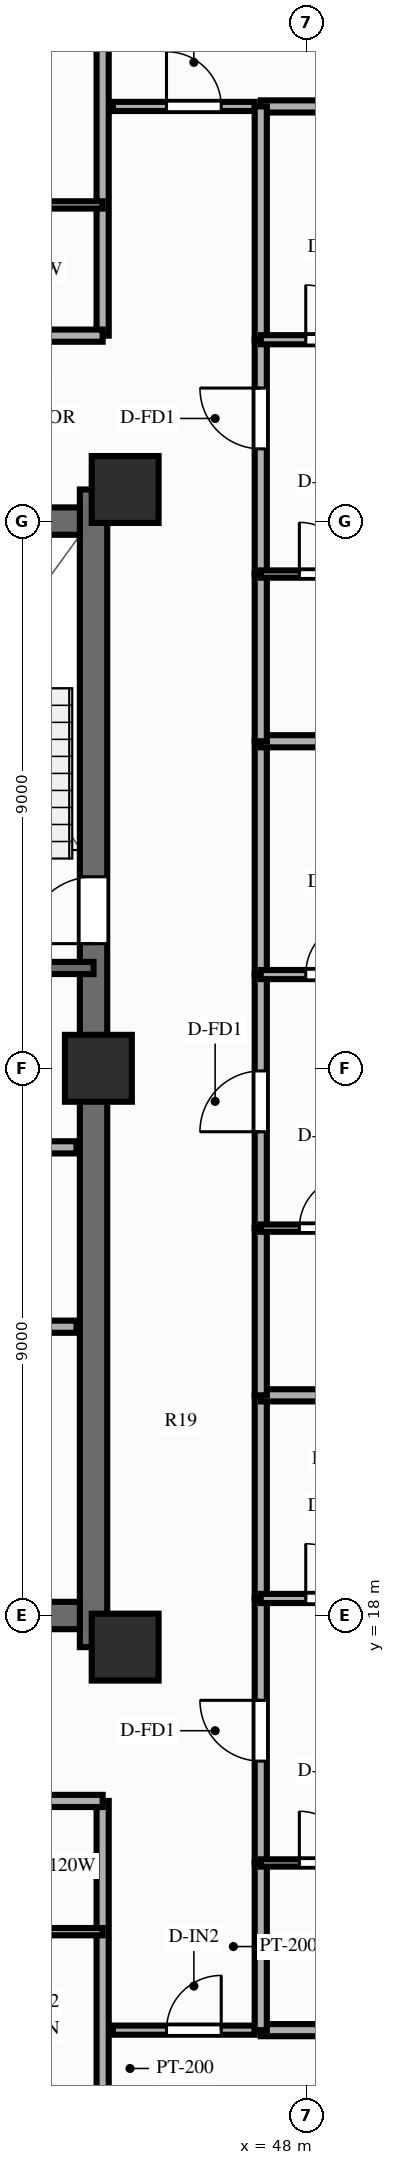
"""IFC4 building model, lengths in metres.
Left out: names, types, materials, properties, quantities, classifications, styles, units other than length and angle.
Written with IfcOpenShell. Run it as: python <this file> out.ifc"""

import sys

from ifc_helpers import new_model, si_unit, direction, frame, frame_2d, origin, origin_2d, place, context, subcontext, project, spatial, rectangle, extrude, source, transform, mapped, element, fill, save


model = new_model("IFC4")
c1 = context("Model", 3, precision=1e-05, world=origin(), true_north=direction((0.0, 1.0)))
c2 = subcontext(c1, "Body", "Model", "MODEL_VIEW")
j1 = project(units=[si_unit("LENGTHUNIT", "METRE"), si_unit("PLANEANGLEUNIT", "RADIAN")], contexts=[c1])
p1 = place(None, origin())
s1 = spatial("IfcSite", under=j1, at=p1, CompositionType="ELEMENT")
p2 = place(p1, origin())
s2 = spatial("IfcBuilding", under=s1, at=p2, CompositionType="ELEMENT")
p3 = place(p2, frame((0.0, 0.0, 172.9)))
s3 = spatial("IfcBuildingStorey", under=s2, at=p3, CompositionType="ELEMENT", Elevation=172.9)
p4 = place(p3, frame((44.5, 17.48, 0.0), z_axis=(0.0, 0.0, 1.0), x_axis=(0.0, 1.0, 0.0)))
e1 = element("IfcWall", 1, at=p4, inside=s3, PredefinedType="SHEAR", context=c2, shape_type="SweptSolid", body=[
    extrude(rectangle(XDim=19.04, YDim=0.45, at=frame_2d((9.52, 0.0))), origin(), (0.0, 0.0, 1.0), 3.9),
])
p5 = place(p4, frame((12.67, 0.0, 0.0), z_axis=(0.0, 0.0, 1.0), x_axis=(-1.0, 0.0, 0.0)))
e2 = element("IfcOpeningElement", 2, at=p5, cuts=e1, PredefinedType="OPENING", context=c2, shape_type="SweptSolid", body=[
    extrude(rectangle(XDim=1.1, YDim=2.15, at=frame_2d((0.55, 1.075))), frame((0.0, 0.237, 0.0), z_axis=(0.0, -1.0, 0.0), x_axis=(1.0, 0.0, 0.0)), (0.0, 0.0, 1.0), 0.474),
])
p6 = place(p3, frame((31.725, 18.0, 0.0), z_axis=(0.0, 0.0, 1.0), x_axis=(1.0, 0.0, 0.0)))
e3 = element("IfcWall", 3, at=p6, inside=s3, PredefinedType="SHEAR", context=c2, shape_type="SweptSolid", body=[
    extrude(rectangle(XDim=12.55, YDim=0.45, at=frame_2d((6.275, 0.0))), origin(), (0.0, 0.0, 1.0), 3.9),
])
p7 = place(p3, frame((31.725, 36.0, 0.0), z_axis=(0.0, 0.0, 1.0), x_axis=(1.0, 0.0, 0.0)))
e4 = element("IfcWall", 4, at=p7, inside=s3, PredefinedType="SHEAR", context=c2, shape_type="SweptSolid", body=[
    extrude(rectangle(XDim=12.55, YDim=0.45, at=frame_2d((6.275, 0.0))), origin(), (0.0, 0.0, 1.0), 3.9),
])
p8 = place(p7, frame((5.225, 0.0, 0.0), z_axis=(0.0, 0.0, 1.0), x_axis=(-1.0, 0.0, 0.0)))
e5 = element("IfcOpeningElement", 5, at=p8, cuts=e4, PredefinedType="OPENING", context=c2, shape_type="SweptSolid", body=[
    extrude(rectangle(XDim=1.4, YDim=2.15, at=frame_2d((0.7, 1.075))), frame((0.0, 0.237, 0.0), z_axis=(0.0, -1.0, 0.0), x_axis=(1.0, 0.0, 0.0)), (0.0, 0.0, 1.0), 0.474),
])
m1 = source(origin(), c2, "Body", "SweptSolid", [
    extrude(rectangle(XDim=1.1, YDim=1.1, at=origin_2d()), origin(), (0.0, 0.0, 1.0), 3.9),
])
for number, where, z_axis, x_axis in (
    (6, (45.02, 17.48, 0.0), (0.0, 0.0, 1.0), (1.0, 0.0, 0.0)),
    (7, (45.02, 36.52, 0.0), (0.0, 0.0, 1.0), (1.0, 0.0, 0.0)),
    (8, (44.58, 27.0, 0.0), (0.0, 0.0, 1.0), (1.0, 0.0, 0.0)),
):
    element("IfcColumn", number, at=place(p3, frame(where, z_axis=z_axis, x_axis=x_axis)), inside=s3, PredefinedType="COLUMN", context=c2, shape_type="MappedRepresentation", body=[
        mapped(m1, transform((0.0, 0.0, 0.0), scale=1.0)),
    ])
p9 = place(p3, frame((41.55, 22.75, 0.0), z_axis=(0.0, 0.0, 1.0), x_axis=(1.0, 0.0, 0.0)))
e9 = element("IfcWall", 9, at=p9, inside=s3, PredefinedType="PARTITIONING", context=c2, shape_type="SweptSolid", body=[
    extrude(rectangle(XDim=2.67, YDim=0.2, at=frame_2d((1.335, 0.0))), origin(), (0.0, 0.0, 1.0), 3.69),
])
p10 = place(p3, frame((41.55, 25.7, 0.0), z_axis=(0.0, 0.0, 1.0), x_axis=(1.0, 0.0, 0.0)))
e10 = element("IfcWall", 10, at=p10, inside=s3, PredefinedType="PARTITIONING", context=c2, shape_type="SweptSolid", body=[
    extrude(rectangle(XDim=2.67, YDim=0.2, at=frame_2d((1.335, 0.0))), origin(), (0.0, 0.0, 1.0), 3.04),
])
p11 = place(p3, frame((40.57, 28.65, 0.0), z_axis=(0.0, 0.0, 1.0), x_axis=(1.0, 0.0, 0.0)))
e11 = element("IfcWall", 11, at=p11, inside=s3, PredefinedType="SOLIDWALL", context=c2, shape_type="SweptSolid", body=[
    extrude(rectangle(XDim=3.93, YDim=0.2, at=frame_2d((1.965, 0.0))), origin(), (0.0, 0.0, 1.0), 3.69),
])
p12 = place(p3, frame((44.82, 11.18, 0.0), z_axis=(0.0, 0.0, 1.0), x_axis=(1.0, 0.0, 0.0)))
e12 = element("IfcWall", 12, at=p12, inside=s3, PredefinedType="PARTITIONING", context=c2, shape_type="SweptSolid", body=[
    extrude(rectangle(XDim=2.33, YDim=0.15, at=frame_2d((1.165, 0.0))), origin(), (0.0, 0.0, 1.0), 3.69),
])
p13 = place(p12, frame((0.88, 0.0, 0.0)))
e13 = element("IfcOpeningElement", 13, at=p13, cuts=e12, PredefinedType="OPENING", context=c2, shape_type="SweptSolid", body=[
    extrude(rectangle(XDim=0.9, YDim=2.1, at=frame_2d((0.45, 1.05))), frame((0.0, 0.087, 0.0), z_axis=(0.0, -1.0, 0.0), x_axis=(1.0, 0.0, 0.0)), (0.0, 0.0, 1.0), 0.174),
])
p14 = place(p3, frame((44.82, 42.82, 0.0), z_axis=(0.0, 0.0, 1.0), x_axis=(1.0, 0.0, 0.0)))
e14 = element("IfcWall", 14, at=p14, inside=s3, PredefinedType="PARTITIONING", context=c2, shape_type="SweptSolid", body=[
    extrude(rectangle(XDim=2.33, YDim=0.15, at=frame_2d((1.165, 0.0))), origin(), (0.0, 0.0, 1.0), 3.69),
])
p15 = place(p14, frame((0.88, 0.0, 0.0)))
e15 = element("IfcOpeningElement", 15, at=p15, cuts=e14, PredefinedType="OPENING", context=c2, shape_type="SweptSolid", body=[
    extrude(rectangle(XDim=0.9, YDim=2.1, at=frame_2d((0.45, 1.05))), frame((0.0, 0.087, 0.0), z_axis=(0.0, -1.0, 0.0), x_axis=(1.0, 0.0, 0.0)), (0.0, 0.0, 1.0), 0.174),
])
p16 = place(p3, frame((44.65, 14.95, 0.0), z_axis=(0.0, 0.0, 1.0), x_axis=(0.0, -1.0, 0.0)))
e16 = element("IfcWall", 16, at=p16, inside=s3, PredefinedType="PARTITIONING", context=c2, shape_type="SweptSolid", body=[
    extrude(rectangle(XDim=8.8, YDim=0.2, at=frame_2d((4.4, 0.0))), origin(), (0.0, 0.0, 1.0), 2.79),
])
p17 = place(p3, frame((41.8, 14.95, 0.0), z_axis=(0.0, 0.0, 1.0), x_axis=(1.0, 0.0, 0.0)))
e17 = element("IfcWall", 17, at=p17, inside=s3, PredefinedType="PARTITIONING", context=c2, shape_type="SweptSolid", body=[
    extrude(rectangle(XDim=2.85, YDim=0.2, at=frame_2d((1.425, 0.0))), origin(), (0.0, 0.0, 1.0), 3.69),
])
p18 = place(p3, frame((41.8, 12.8, 0.0), z_axis=(0.0, 0.0, 1.0), x_axis=(1.0, 0.0, 0.0)))
e18 = element("IfcWall", 18, at=p18, inside=s3, PredefinedType="PARTITIONING", context=c2, shape_type="SweptSolid", body=[
    extrude(rectangle(XDim=2.85, YDim=0.12, at=frame_2d((1.425, 0.0))), origin(), (0.0, 0.0, 1.0), 3.69),
])
p19 = place(p3, frame((44.65, 39.05, 0.0), z_axis=(0.0, 0.0, 1.0), x_axis=(0.0, 1.0, 0.0)))
e19 = element("IfcWall", 19, at=p19, inside=s3, PredefinedType="PARTITIONING", context=c2, shape_type="SweptSolid", body=[
    extrude(rectangle(XDim=8.8, YDim=0.2, at=frame_2d((4.4, 0.0))), origin(), (0.0, 0.0, 1.0), 2.79),
])
p20 = place(p3, frame((42.085, 39.05, 0.0), z_axis=(0.0, 0.0, 1.0), x_axis=(1.0, 0.0, 0.0)))
e20 = element("IfcWall", 20, at=p20, inside=s3, PredefinedType="PARTITIONING", context=c2, shape_type="SweptSolid", body=[
    extrude(rectangle(XDim=2.564, YDim=0.2, at=frame_2d((1.282, 0.0))), origin(), (0.0, 0.0, 1.0), 3.69),
])
p21 = place(p3, frame((42.085, 41.2, 0.0), z_axis=(0.0, 0.0, 1.0), x_axis=(1.0, 0.0, 0.0)))
e21 = element("IfcWall", 21, at=p21, inside=s3, PredefinedType="PARTITIONING", context=c2, shape_type="SweptSolid", body=[
    extrude(rectangle(XDim=2.564, YDim=0.12, at=frame_2d((1.282, 0.0))), origin(), (0.0, 0.0, 1.0), 3.69),
])
for number, where, z_axis, x_axis in (
    (22, (47.25, 11.18, 0.0), (0.0, 0.0, 1.0), (1.0, 0.0, 0.0)),
    (23, (47.25, 42.82, 0.0), (0.0, 0.0, 1.0), (1.0, 0.0, 0.0)),
):
    element("IfcWall", number, at=place(p3, frame(where, z_axis=z_axis, x_axis=x_axis)), inside=s3, PredefinedType="PARTITIONING", context=c2, shape_type="SweptSolid", body=[
        extrude(rectangle(XDim=10.85, YDim=0.2, at=frame_2d((5.425, 0.0))), origin(), (0.0, 0.0, 1.0), 3.69),
    ])
p22 = place(p3, frame((47.25, 11.18, 0.0), z_axis=(0.0, 0.0, 1.0), x_axis=(0.0, 1.0, 0.0)))
e24 = element("IfcWall", 24, at=p22, inside=s3, PredefinedType="PARTITIONING", context=c2, shape_type="SweptSolid", body=[
    extrude(rectangle(XDim=2.75, YDim=0.2, at=frame_2d((1.375, 0.0))), origin(), (0.0, 0.0, 1.0), 3.69),
])
p23 = place(p3, frame((47.25, 13.93, 0.0), z_axis=(0.0, 0.0, 1.0), x_axis=(0.0, 1.0, 0.0)))
e25 = element("IfcWall", 25, at=p23, inside=s3, PredefinedType="PARTITIONING", context=c2, shape_type="SweptSolid", body=[
    extrude(rectangle(XDim=4.35, YDim=0.2, at=frame_2d((2.175, 0.0))), origin(), (0.0, 0.0, 1.0), 3.69),
])
p24 = place(p23, frame((1.675, 0.0, 0.0)))
e26 = element("IfcOpeningElement", 26, at=p24, cuts=e25, PredefinedType="OPENING", context=c2, shape_type="SweptSolid", body=[
    extrude(rectangle(XDim=1.0, YDim=2.15, at=frame_2d((0.5, 1.075))), frame((0.0, 0.112, 0.0), z_axis=(0.0, -1.0, 0.0), x_axis=(1.0, 0.0, 0.0)), (0.0, 0.0, 1.0), 0.224),
])
p25 = place(p3, frame((47.25, 18.28, 0.0), z_axis=(0.0, 0.0, 1.0), x_axis=(0.0, 1.0, 0.0)))
e27 = element("IfcWall", 27, at=p25, inside=s3, PredefinedType="PARTITIONING", context=c2, shape_type="SweptSolid", body=[
    extrude(rectangle(XDim=3.341, YDim=0.2, at=frame_2d((1.67, 0.0))), origin(), (0.0, 0.0, 1.0), 3.69),
])
p26 = place(p3, frame((47.25, 13.93, 0.0), z_axis=(0.0, 0.0, 1.0), x_axis=(1.0, 0.0, 0.0)))
e28 = element("IfcWall", 28, at=p26, inside=s3, PredefinedType="PARTITIONING", context=c2, shape_type="SweptSolid", body=[
    extrude(rectangle(XDim=2.12, YDim=0.12, at=frame_2d((1.06, 0.0))), origin(), (0.0, 0.0, 1.0), 3.69),
])
p27 = place(p26, frame((0.635, 0.0, 0.0)))
e29 = element("IfcOpeningElement", 29, at=p27, cuts=e28, PredefinedType="OPENING", context=c2, shape_type="SweptSolid", body=[
    extrude(rectangle(XDim=0.85, YDim=2.05, at=frame_2d((0.425, 1.025))), frame((0.0, 0.072, 0.0), z_axis=(0.0, -1.0, 0.0), x_axis=(1.0, 0.0, 0.0)), (0.0, 0.0, 1.0), 0.144),
])
p28 = place(p3, frame((47.25, 18.28, 0.0), z_axis=(0.0, 0.0, 1.0), x_axis=(1.0, 0.0, 0.0)))
e30 = element("IfcWall", 30, at=p28, inside=s3, PredefinedType="PARTITIONING", context=c2, shape_type="SweptSolid", body=[
    extrude(rectangle(XDim=2.38, YDim=0.15, at=frame_2d((1.19, 0.0))), origin(), (0.0, 0.0, 1.0), 3.69),
])
p29 = place(p28, frame((0.74, 0.0, 0.0)))
e31 = element("IfcOpeningElement", 31, at=p29, cuts=e30, PredefinedType="OPENING", context=c2, shape_type="SweptSolid", body=[
    extrude(rectangle(XDim=0.9, YDim=2.1, at=frame_2d((0.45, 1.05))), frame((0.0, 0.087, 0.0), z_axis=(0.0, -1.0, 0.0), x_axis=(1.0, 0.0, 0.0)), (0.0, 0.0, 1.0), 0.174),
])
p30 = place(p3, frame((47.25, 21.621, 0.0), z_axis=(0.0, 0.0, 1.0), x_axis=(1.0, 0.0, 0.0)))
e32 = element("IfcWall", 32, at=p30, inside=s3, PredefinedType="PARTITIONING", context=c2, shape_type="SweptSolid", body=[
    extrude(rectangle(XDim=10.85, YDim=0.2, at=frame_2d((5.425, 0.0))), origin(), (0.0, 0.0, 1.0), 3.29),
])
p31 = place(p3, frame((47.25, 21.621, 0.0), z_axis=(0.0, 0.0, 1.0), x_axis=(0.0, 1.0, 0.0)))
e33 = element("IfcWall", 33, at=p31, inside=s3, PredefinedType="PARTITIONING", context=c2, shape_type="SweptSolid", body=[
    extrude(rectangle(XDim=2.75, YDim=0.2, at=frame_2d((1.375, 0.0))), origin(), (0.0, 0.0, 1.0), 3.69),
])
p32 = place(p3, frame((47.25, 24.371, 0.0), z_axis=(0.0, 0.0, 1.0), x_axis=(0.0, 1.0, 0.0)))
e34 = element("IfcWall", 34, at=p32, inside=s3, PredefinedType="PARTITIONING", context=c2, shape_type="SweptSolid", body=[
    extrude(rectangle(XDim=4.171, YDim=0.2, at=frame_2d((2.085, 0.0))), origin(), (0.0, 0.0, 1.0), 3.69),
])
p33 = place(p32, frame((1.585, 0.0, 0.0)))
e35 = element("IfcOpeningElement", 35, at=p33, cuts=e34, PredefinedType="OPENING", context=c2, shape_type="SweptSolid", body=[
    extrude(rectangle(XDim=1.0, YDim=2.15, at=frame_2d((0.5, 1.075))), frame((0.0, 0.112, 0.0), z_axis=(0.0, -1.0, 0.0), x_axis=(1.0, 0.0, 0.0)), (0.0, 0.0, 1.0), 0.224),
])
p34 = place(p3, frame((47.25, 28.542, 0.0), z_axis=(0.0, 0.0, 1.0), x_axis=(0.0, 1.0, 0.0)))
e36 = element("IfcWall", 36, at=p34, inside=s3, PredefinedType="PARTITIONING", context=c2, shape_type="SweptSolid", body=[
    extrude(rectangle(XDim=3.837, YDim=0.2, at=frame_2d((1.918, 0.0))), origin(), (0.0, 0.0, 1.0), 3.69),
])
p35 = place(p3, frame((47.25, 24.371, 0.0), z_axis=(0.0, 0.0, 1.0), x_axis=(1.0, 0.0, 0.0)))
e37 = element("IfcWall", 37, at=p35, inside=s3, PredefinedType="PARTITIONING", context=c2, shape_type="SweptSolid", body=[
    extrude(rectangle(XDim=2.12, YDim=0.12, at=frame_2d((1.06, 0.0))), origin(), (0.0, 0.0, 1.0), 3.69),
])
p36 = place(p35, frame((0.635, 0.0, 0.0)))
e38 = element("IfcOpeningElement", 38, at=p36, cuts=e37, PredefinedType="OPENING", context=c2, shape_type="SweptSolid", body=[
    extrude(rectangle(XDim=0.85, YDim=2.05, at=frame_2d((0.425, 1.025))), frame((0.0, 0.072, 0.0), z_axis=(0.0, -1.0, 0.0), x_axis=(1.0, 0.0, 0.0)), (0.0, 0.0, 1.0), 0.144),
])
p37 = place(p3, frame((47.25, 28.542, 0.0), z_axis=(0.0, 0.0, 1.0), x_axis=(1.0, 0.0, 0.0)))
e39 = element("IfcWall", 39, at=p37, inside=s3, PredefinedType="PARTITIONING", context=c2, shape_type="SweptSolid", body=[
    extrude(rectangle(XDim=2.38, YDim=0.15, at=frame_2d((1.19, 0.0))), origin(), (0.0, 0.0, 1.0), 3.69),
])
p38 = place(p37, frame((0.74, 0.0, 0.0)))
e40 = element("IfcOpeningElement", 40, at=p38, cuts=e39, PredefinedType="OPENING", context=c2, shape_type="SweptSolid", body=[
    extrude(rectangle(XDim=0.9, YDim=2.1, at=frame_2d((0.45, 1.05))), frame((0.0, 0.087, 0.0), z_axis=(0.0, -1.0, 0.0), x_axis=(1.0, 0.0, 0.0)), (0.0, 0.0, 1.0), 0.174),
])
p39 = place(p3, frame((47.25, 32.379, 0.0), z_axis=(0.0, 0.0, 1.0), x_axis=(1.0, 0.0, 0.0)))
e41 = element("IfcWall", 41, at=p39, inside=s3, PredefinedType="PARTITIONING", context=c2, shape_type="SweptSolid", body=[
    extrude(rectangle(XDim=10.85, YDim=0.2, at=frame_2d((5.425, 0.0))), origin(), (0.0, 0.0, 1.0), 3.29),
])
p40 = place(p3, frame((47.25, 32.379, 0.0), z_axis=(0.0, 0.0, 1.0), x_axis=(0.0, 1.0, 0.0)))
e42 = element("IfcWall", 42, at=p40, inside=s3, PredefinedType="PARTITIONING", context=c2, shape_type="SweptSolid", body=[
    extrude(rectangle(XDim=2.75, YDim=0.2, at=frame_2d((1.375, 0.0))), origin(), (0.0, 0.0, 1.0), 3.69),
])
p41 = place(p3, frame((47.25, 35.129, 0.0), z_axis=(0.0, 0.0, 1.0), x_axis=(0.0, 1.0, 0.0)))
e43 = element("IfcWall", 43, at=p41, inside=s3, PredefinedType="PARTITIONING", context=c2, shape_type="SweptSolid", body=[
    extrude(rectangle(XDim=3.854, YDim=0.2, at=frame_2d((1.927, 0.0))), origin(), (0.0, 0.0, 1.0), 3.69),
])
p42 = place(p41, frame((2.059, 0.0, 0.0)))
e44 = element("IfcOpeningElement", 44, at=p42, cuts=e43, PredefinedType="OPENING", context=c2, shape_type="SweptSolid", body=[
    extrude(rectangle(XDim=1.0, YDim=2.15, at=frame_2d((0.5, 1.075))), frame((0.0, 0.112, 0.0), z_axis=(0.0, -1.0, 0.0), x_axis=(1.0, 0.0, 0.0)), (0.0, 0.0, 1.0), 0.224),
])
p43 = place(p3, frame((47.25, 38.983, 0.0), z_axis=(0.0, 0.0, 1.0), x_axis=(0.0, 1.0, 0.0)))
e45 = element("IfcWall", 45, at=p43, inside=s3, PredefinedType="PARTITIONING", context=c2, shape_type="SweptSolid", body=[
    extrude(rectangle(XDim=3.837, YDim=0.2, at=frame_2d((1.918, 0.0))), origin(), (0.0, 0.0, 1.0), 3.69),
])
p44 = place(p3, frame((47.25, 35.129, 0.0), z_axis=(0.0, 0.0, 1.0), x_axis=(1.0, 0.0, 0.0)))
e46 = element("IfcWall", 46, at=p44, inside=s3, PredefinedType="PARTITIONING", context=c2, shape_type="SweptSolid", body=[
    extrude(rectangle(XDim=2.12, YDim=0.12, at=frame_2d((1.06, 0.0))), origin(), (0.0, 0.0, 1.0), 3.69),
])
p45 = place(p44, frame((0.635, 0.0, 0.0)))
e47 = element("IfcOpeningElement", 47, at=p45, cuts=e46, PredefinedType="OPENING", context=c2, shape_type="SweptSolid", body=[
    extrude(rectangle(XDim=0.85, YDim=2.05, at=frame_2d((0.425, 1.025))), frame((0.0, 0.072, 0.0), z_axis=(0.0, -1.0, 0.0), x_axis=(1.0, 0.0, 0.0)), (0.0, 0.0, 1.0), 0.144),
])
p46 = place(p3, frame((47.25, 38.983, 0.0), z_axis=(0.0, 0.0, 1.0), x_axis=(1.0, 0.0, 0.0)))
e48 = element("IfcWall", 48, at=p46, inside=s3, PredefinedType="PARTITIONING", context=c2, shape_type="SweptSolid", body=[
    extrude(rectangle(XDim=2.38, YDim=0.15, at=frame_2d((1.19, 0.0))), origin(), (0.0, 0.0, 1.0), 3.69),
])
p47 = place(p46, frame((0.74, 0.0, 0.0)))
e49 = element("IfcOpeningElement", 49, at=p47, cuts=e48, PredefinedType="OPENING", context=c2, shape_type="SweptSolid", body=[
    extrude(rectangle(XDim=0.9, YDim=2.1, at=frame_2d((0.45, 1.05))), frame((0.0, 0.087, 0.0), z_axis=(0.0, -1.0, 0.0), x_axis=(1.0, 0.0, 0.0)), (0.0, 0.0, 1.0), 0.174),
])
m2 = source(origin(), c2, "Body", "SweptSolid", [
    extrude(rectangle(XDim=1.1, YDim=2.15, at=frame_2d((0.55, 1.075))), frame((0.0, 0.025, 0.0), z_axis=(0.0, -1.0, 0.0), x_axis=(1.0, 0.0, 0.0)), (0.0, 0.0, 1.0), 0.05),
])
p48 = place(p5, origin())
e50 = element("IfcDoor", 50, at=p48, inside=s3, OperationType="SINGLE_SWING_RIGHT", PredefinedType="DOOR", context=c2, shape_type="MappedRepresentation", body=[
    mapped(m2, transform((0.0, 0.0, 0.0), scale=1.0)),
])
fill(e2, e50)
m3 = source(origin(), c2, "Body", "SweptSolid", [
    extrude(rectangle(XDim=0.9, YDim=2.1, at=frame_2d((0.45, 1.05))), frame((0.0, 0.025, 0.0), z_axis=(0.0, -1.0, 0.0), x_axis=(1.0, 0.0, 0.0)), (0.0, 0.0, 1.0), 0.05),
])
p49 = place(p13, origin())
e51 = element("IfcDoor", 51, at=p49, inside=s3, OperationType="SINGLE_SWING_RIGHT", PredefinedType="DOOR", context=c2, shape_type="MappedRepresentation", body=[
    mapped(m3, transform((0.0, 0.0, 0.0), scale=1.0)),
])
fill(e13, e51)
p50 = place(p15, origin())
e52 = element("IfcDoor", 52, at=p50, inside=s3, OperationType="SINGLE_SWING_LEFT", PredefinedType="DOOR", context=c2, shape_type="MappedRepresentation", body=[
    mapped(m3, transform((0.0, 0.0, 0.0), scale=1.0)),
])
fill(e15, e52)
m4 = source(origin(), c2, "Body", "SweptSolid", [
    extrude(rectangle(XDim=1.0, YDim=2.15, at=frame_2d((0.5, 1.075))), frame((0.0, 0.025, 0.0), z_axis=(0.0, -1.0, 0.0), x_axis=(1.0, 0.0, 0.0)), (0.0, 0.0, 1.0), 0.05),
])
p51 = place(p24, origin())
e53 = element("IfcDoor", 53, at=p51, inside=s3, OperationType="SINGLE_SWING_RIGHT", PredefinedType="DOOR", context=c2, shape_type="MappedRepresentation", body=[
    mapped(m4, transform((0.0, 0.0, 0.0), scale=1.0)),
])
fill(e26, e53)
m5 = source(origin(), c2, "Body", "SweptSolid", [
    extrude(rectangle(XDim=0.85, YDim=2.05, at=frame_2d((0.425, 1.025))), frame((0.0, 0.025, 0.0), z_axis=(0.0, -1.0, 0.0), x_axis=(1.0, 0.0, 0.0)), (0.0, 0.0, 1.0), 0.05),
])
p52 = place(p27, origin())
e54 = element("IfcDoor", 54, at=p52, inside=s3, OperationType="SINGLE_SWING_LEFT", PredefinedType="DOOR", context=c2, shape_type="MappedRepresentation", body=[
    mapped(m5, transform((0.0, 0.0, 0.0), scale=1.0)),
])
fill(e29, e54)
p53 = place(p29, origin())
e55 = element("IfcDoor", 55, at=p53, inside=s3, OperationType="SINGLE_SWING_LEFT", PredefinedType="DOOR", context=c2, shape_type="MappedRepresentation", body=[
    mapped(m3, transform((0.0, 0.0, 0.0), scale=1.0)),
])
fill(e31, e55)
p54 = place(p33, origin())
e56 = element("IfcDoor", 56, at=p54, inside=s3, OperationType="SINGLE_SWING_LEFT", PredefinedType="DOOR", context=c2, shape_type="MappedRepresentation", body=[
    mapped(m4, transform((0.0, 0.0, 0.0), scale=1.0)),
])
fill(e35, e56)
p55 = place(p36, origin())
e57 = element("IfcDoor", 57, at=p55, inside=s3, OperationType="SINGLE_SWING_RIGHT", PredefinedType="DOOR", context=c2, shape_type="MappedRepresentation", body=[
    mapped(m5, transform((0.0, 0.0, 0.0), scale=1.0)),
])
fill(e38, e57)
p56 = place(p38, origin())
e58 = element("IfcDoor", 58, at=p56, inside=s3, OperationType="SINGLE_SWING_RIGHT", PredefinedType="DOOR", context=c2, shape_type="MappedRepresentation", body=[
    mapped(m3, transform((0.0, 0.0, 0.0), scale=1.0)),
])
fill(e40, e58)
p57 = place(p42, origin())
e59 = element("IfcDoor", 59, at=p57, inside=s3, OperationType="SINGLE_SWING_RIGHT", PredefinedType="DOOR", context=c2, shape_type="MappedRepresentation", body=[
    mapped(m4, transform((0.0, 0.0, 0.0), scale=1.0)),
])
fill(e44, e59)
p58 = place(p45, origin())
e60 = element("IfcDoor", 60, at=p58, inside=s3, OperationType="SINGLE_SWING_LEFT", PredefinedType="DOOR", context=c2, shape_type="MappedRepresentation", body=[
    mapped(m5, transform((0.0, 0.0, 0.0), scale=1.0)),
])
fill(e47, e60)
p59 = place(p47, origin())
e61 = element("IfcDoor", 61, at=p59, inside=s3, OperationType="SINGLE_SWING_LEFT", PredefinedType="DOOR", context=c2, shape_type="MappedRepresentation", body=[
    mapped(m3, transform((0.0, 0.0, 0.0), scale=1.0)),
])
fill(e49, e61)
save(model, sys.argv[1])
